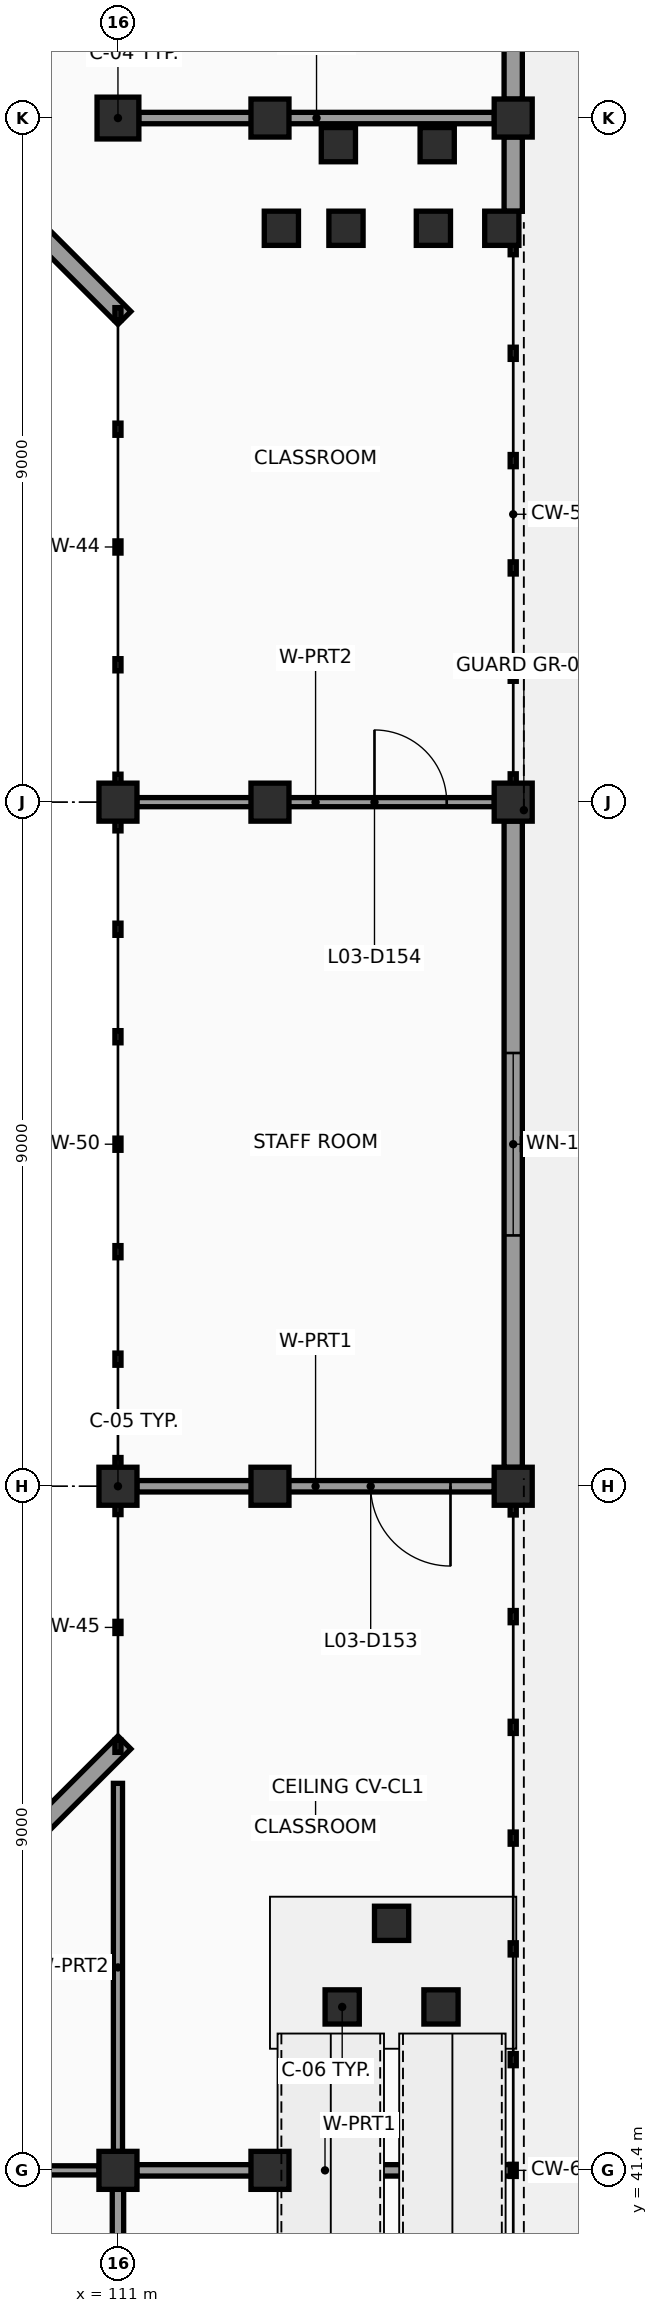
"""IFC4 building model, lengths in metres.
Left out: names, types, materials, properties, quantities, classifications, styles, units other than length and angle.
Written with IfcOpenShell. Run it as: python <this file> out.ifc"""

import sys

from ifc_helpers import new_model, si_unit, direction, frame, frame_2d, origin, origin_2d, place, context, subcontext, project, spatial, rectangle, extrude, element, fill, save


model = new_model("IFC4")
c1 = context("Model", 3, precision=1e-05, world=origin(), true_north=direction((0.0, 1.0)))
c2 = subcontext(c1, "Body", "Model", "MODEL_VIEW")
j1 = project(units=[si_unit("LENGTHUNIT", "METRE"), si_unit("PLANEANGLEUNIT", "RADIAN")], contexts=[c1])
p1 = place(None, origin())
s1 = spatial("IfcSite", under=j1, at=p1, CompositionType="ELEMENT")
p2 = place(p1, origin())
s2 = spatial("IfcBuilding", under=s1, at=p2, CompositionType="ELEMENT")
p3 = place(p2, frame((0.0, 0.0, 11.4)))
s3 = spatial("IfcBuildingStorey", under=s2, at=p3, CompositionType="ELEMENT", Elevation=11.4)
for number, where, z_axis, x_axis in (
    (1, (111.0, 41.4, 0.0), (0.0, 0.0, 1.0), (1.0, 0.0, 0.0)),
    (2, (111.0, 50.4, 0.0), (0.0, 0.0, 1.0), (1.0, 0.0, 0.0)),
    (3, (111.0, 59.4, 0.0), (0.0, 0.0, 1.0), (1.0, 0.0, 0.0)),
):
    element("IfcColumn", number, at=place(p3, frame(where, z_axis=z_axis, x_axis=x_axis)), inside=s3, PredefinedType="COLUMN", context=c2, shape_type="SweptSolid", body=[
        extrude(rectangle(XDim=0.5, YDim=0.5, at=origin_2d()), origin(), (0.0, 0.0, 1.0), 3.34),
    ])
p4 = place(p3, frame((111.0, 68.4, 0.0), z_axis=(0.0, 0.0, 1.0), x_axis=(1.0, 0.0, 0.0)))
e4 = element("IfcColumn", 4, at=p4, inside=s3, PredefinedType="COLUMN", context=c2, shape_type="SweptSolid", body=[
    extrude(rectangle(XDim=0.55, YDim=0.55, at=origin_2d()), origin(), (0.0, 0.0, 1.0), 3.6),
])
for number, where, z_axis, x_axis in (
    (5, (116.2, 50.4, 0.0), (0.0, 0.0, 1.0), (1.0, 0.0, 0.0)),
    (6, (116.2, 59.4, 0.0), (0.0, 0.0, 1.0), (1.0, 0.0, 0.0)),
):
    element("IfcColumn", number, at=place(p3, frame(where, z_axis=z_axis, x_axis=x_axis)), inside=s3, PredefinedType="COLUMN", context=c2, shape_type="SweptSolid", body=[
        extrude(rectangle(XDim=0.5, YDim=0.5, at=origin_2d()), origin(), (0.0, 0.0, 1.0), 3.28),
    ])
p5 = place(p3, frame((116.2, 68.4, 0.0), z_axis=(0.0, 0.0, 1.0), x_axis=(1.0, 0.0, 0.0)))
e7 = element("IfcColumn", 7, at=p5, inside=s3, PredefinedType="COLUMN", context=c2, shape_type="SweptSolid", body=[
    extrude(rectangle(XDim=0.5, YDim=0.5, at=origin_2d()), origin(), (0.0, 0.0, 1.0), 3.6),
])
for number, where, z_axis, x_axis in (
    (8, (113.0, 41.4, 0.0), (0.0, 0.0, 1.0), (1.0, 0.0, 0.0)),
    (9, (113.0, 50.4, 0.0), (0.0, 0.0, 1.0), (1.0, 0.0, 0.0)),
    (10, (113.0, 59.4, 0.0), (0.0, 0.0, 1.0), (1.0, 0.0, 0.0)),
):
    element("IfcColumn", number, at=place(p3, frame(where, z_axis=z_axis, x_axis=x_axis)), inside=s3, PredefinedType="COLUMN", context=c2, shape_type="SweptSolid", body=[
        extrude(rectangle(XDim=0.5, YDim=0.5, at=origin_2d()), origin(), (0.0, 0.0, 1.0), 3.28),
    ])
p6 = place(p3, frame((113.0, 68.4, 0.0), z_axis=(0.0, 0.0, 1.0), x_axis=(1.0, 0.0, 0.0)))
e11 = element("IfcColumn", 11, at=p6, inside=s3, PredefinedType="COLUMN", context=c2, shape_type="SweptSolid", body=[
    extrude(rectangle(XDim=0.5, YDim=0.5, at=origin_2d()), origin(), (0.0, 0.0, 1.0), 3.6),
])
for number, where, z_axis, x_axis in (
    (12, (113.95, 43.55, 0.0), (0.0, 0.0, 1.0), (1.0, 0.0, 0.0)),
    (13, (115.25, 43.55, 0.0), (0.0, 0.0, 1.0), (1.0, 0.0, 0.0)),
    (14, (114.6, 44.65, 0.0), (0.0, 0.0, 1.0), (1.0, 0.0, 0.0)),
):
    element("IfcColumn", number, at=place(p3, frame(where, z_axis=z_axis, x_axis=x_axis)), inside=s3, PredefinedType="COLUMN", context=c2, shape_type="SweptSolid", body=[
        extrude(rectangle(XDim=0.45, YDim=0.45, at=origin_2d()), origin(), (0.0, 0.0, 1.0), 1.58),
    ])
for number, where, z_axis, x_axis in (
    (15, (115.15, 66.95, 0.0), (0.0, 0.0, 1.0), (1.0, 0.0, 0.0)),
    (16, (116.05, 66.95, 0.0), (0.0, 0.0, 1.0), (1.0, 0.0, 0.0)),
    (17, (115.2, 68.05, 0.0), (0.0, 0.0, 1.0), (1.0, 0.0, 0.0)),
):
    element("IfcColumn", number, at=place(p3, frame(where, z_axis=z_axis, x_axis=x_axis)), inside=s3, PredefinedType="COLUMN", context=c2, shape_type="SweptSolid", body=[
        extrude(rectangle(XDim=0.45, YDim=0.45, at=origin_2d()), origin(), (0.0, 0.0, 1.0), 3.6),
    ])
for number, where, z_axis, x_axis in (
    (18, (113.15, 66.95, 0.0), (0.0, 0.0, 1.0), (1.0, 0.0, 0.0)),
    (19, (114.0, 66.95, 0.0), (0.0, 0.0, 1.0), (1.0, 0.0, 0.0)),
    (20, (113.9, 68.05, 0.0), (0.0, 0.0, 1.0), (1.0, 0.0, 0.0)),
):
    element("IfcColumn", number, at=place(p3, frame(where, z_axis=z_axis, x_axis=x_axis)), inside=s3, PredefinedType="COLUMN", context=c2, shape_type="SweptSolid", body=[
        extrude(rectangle(XDim=0.45, YDim=0.45, at=origin_2d()), origin(), (0.0, 0.0, 1.0), 3.38),
    ])
p7 = place(p3, frame((116.2, 71.152, 0.0), z_axis=(0.0, 0.0, 1.0), x_axis=(0.0, -1.0, 0.0)))
e21 = element("IfcWall", 21, at=p7, inside=s3, PredefinedType="SOLIDWALL", context=c2, shape_type="SweptSolid", body=[
    extrude(rectangle(XDim=2.504, YDim=0.24, at=frame_2d((1.252, 0.0))), origin(), (0.0, 0.0, 1.0), 3.34),
])
p8 = place(p3, frame((116.2, 68.152, 0.0), z_axis=(0.0, 0.0, 1.0), x_axis=(0.0, -1.0, 0.0)))
e22 = element("IfcWall", 22, at=p8, inside=s3, PredefinedType="SOLIDWALL", context=c2, shape_type="SweptSolid", body=[
    extrude(rectangle(XDim=0.979, YDim=0.24, at=frame_2d((0.49, 0.0))), origin(), (0.0, 0.0, 1.0), 3.34),
])
p9 = place(p3, frame((116.2, 59.152, 0.0), z_axis=(0.0, 0.0, 1.0), x_axis=(0.0, -1.0, 0.0)))
e23 = element("IfcWall", 23, at=p9, inside=s3, PredefinedType="SOLIDWALL", context=c2, shape_type="SweptSolid", body=[
    extrude(rectangle(XDim=8.504, YDim=0.24, at=frame_2d((4.252, 0.0))), origin(), (0.0, 0.0, 1.0), 3.34),
])
p10 = place(p9, frame((3.052, 0.0, 0.95)))
e24 = element("IfcOpeningElement", 24, at=p10, cuts=e23, PredefinedType="OPENING", context=c2, shape_type="SweptSolid", body=[
    extrude(rectangle(XDim=2.4, YDim=1.5, at=frame_2d((1.2, 0.75))), frame((0.0, 0.13, 0.0), z_axis=(0.0, -1.0, 0.0), x_axis=(1.0, 0.0, 0.0)), (0.0, 0.0, 1.0), 0.26),
])
p11 = place(p3, frame((105.371, 41.315, 0.0), z_axis=(0.0, 0.0, 1.0), x_axis=(0.707121887885, 0.707091674165, 0.0)))
e25 = element("IfcWall", 25, at=p11, inside=s3, PredefinedType="SOLIDWALL", context=c2, shape_type="SweptSolid", body=[
    extrude(rectangle(XDim=8.081, YDim=0.24, at=frame_2d((4.04, 0.0))), origin(), (0.0, 0.0, 1.0), 2.53),
])
p12 = place(p3, frame((111.085, 65.771, 0.0), z_axis=(0.0, 0.0, 1.0), x_axis=(-0.707106781187, 0.707106781187, 0.0)))
e26 = element("IfcWall", 26, at=p12, inside=s3, PredefinedType="SOLIDWALL", context=c2, shape_type="SweptSolid", body=[
    extrude(rectangle(XDim=8.081, YDim=0.24, at=frame_2d((4.04, 0.0))), origin(), (0.0, 0.0, 1.0), 2.58),
])
p13 = place(p3, frame((105.908, 41.4, 0.0), z_axis=(0.0, 0.0, 1.0), x_axis=(1.0, 0.0, 0.0)))
e27 = element("IfcWall", 27, at=p13, inside=s3, PredefinedType="PARTITIONING", context=c2, shape_type="SweptSolid", body=[
    extrude(rectangle(XDim=4.844, YDim=0.12, at=frame_2d((2.422, 0.0))), origin(), (0.0, 0.0, 1.0), 2.53),
])
p14 = place(p13, frame((1.922, 0.0, 0.0)))
e28 = element("IfcOpeningElement", 28, at=p14, cuts=e27, PredefinedType="OPENING", context=c2, shape_type="SweptSolid", body=[
    extrude(rectangle(XDim=1.0, YDim=2.1, at=frame_2d((0.5, 1.05))), frame((0.0, 0.07, 0.0), z_axis=(0.0, -1.0, 0.0), x_axis=(1.0, 0.0, 0.0)), (0.0, 0.0, 1.0), 0.14),
])
p15 = place(p3, frame((111.0, 41.152, 0.0), z_axis=(0.0, 0.0, 1.0), x_axis=(0.0, -1.0, 0.0)))
e29 = element("IfcWall", 29, at=p15, inside=s3, PredefinedType="PARTITIONING", context=c2, shape_type="SweptSolid", body=[
    extrude(rectangle(XDim=8.429, YDim=0.15, at=frame_2d((4.215, 0.0))), origin(), (0.0, 0.0, 1.0), 2.92),
])
p16 = place(p3, frame((111.248, 41.4, 0.0), z_axis=(0.0, 0.0, 1.0), x_axis=(1.0, 0.0, 0.0)))
e30 = element("IfcWall", 30, at=p16, inside=s3, PredefinedType="PARTITIONING", context=c2, shape_type="SweptSolid", body=[
    extrude(rectangle(XDim=4.952, YDim=0.15, at=frame_2d((2.476, 0.0))), origin(), (0.0, 0.0, 1.0), 3.34),
])
p17 = place(p3, frame((111.0, 41.648, 0.0), z_axis=(0.0, 0.0, 1.0), x_axis=(0.0, 1.0, 0.0)))
e31 = element("IfcWall", 31, at=p17, inside=s3, PredefinedType="PARTITIONING", context=c2, shape_type="SweptSolid", body=[
    extrude(rectangle(XDim=4.844, YDim=0.12, at=frame_2d((2.422, 0.0))), origin(), (0.0, 0.0, 1.0), 2.92),
])
p18 = place(p3, frame((111.248, 50.4, 0.0), z_axis=(0.0, 0.0, 1.0), x_axis=(1.0, 0.0, 0.0)))
e32 = element("IfcWall", 32, at=p18, inside=s3, PredefinedType="PARTITIONING", context=c2, shape_type="SweptSolid", body=[
    extrude(rectangle(XDim=4.704, YDim=0.15, at=frame_2d((2.352, 0.0))), origin(), (0.0, 0.0, 1.0), 3.34),
])
p19 = place(p18, frame((3.077, 0.0, 0.0)))
e33 = element("IfcOpeningElement", 33, at=p19, cuts=e32, PredefinedType="OPENING", context=c2, shape_type="SweptSolid", body=[
    extrude(rectangle(XDim=1.05, YDim=2.15, at=frame_2d((0.525, 1.075))), frame((0.0, 0.085, 0.0), z_axis=(0.0, -1.0, 0.0), x_axis=(1.0, 0.0, 0.0)), (0.0, 0.0, 1.0), 0.17),
])
p20 = place(p3, frame((111.248, 59.4, 0.0), z_axis=(0.0, 0.0, 1.0), x_axis=(1.0, 0.0, 0.0)))
e34 = element("IfcWall", 34, at=p20, inside=s3, PredefinedType="PARTITIONING", context=c2, shape_type="SweptSolid", body=[
    extrude(rectangle(XDim=4.704, YDim=0.12, at=frame_2d((2.352, 0.0))), origin(), (0.0, 0.0, 1.0), 3.34),
])
p21 = place(p20, frame((3.127, 0.0, 0.0)))
e35 = element("IfcOpeningElement", 35, at=p21, cuts=e34, PredefinedType="OPENING", context=c2, shape_type="SweptSolid", body=[
    extrude(rectangle(XDim=0.95, YDim=2.1, at=frame_2d((0.475, 1.05))), frame((0.0, 0.07, 0.0), z_axis=(0.0, -1.0, 0.0), x_axis=(1.0, 0.0, 0.0)), (0.0, 0.0, 1.0), 0.14),
])
p22 = place(p3, frame((111.273, 68.4, 0.0), z_axis=(0.0, 0.0, 1.0), x_axis=(1.0, 0.0, 0.0)))
e36 = element("IfcWall", 36, at=p22, inside=s3, PredefinedType="PARTITIONING", context=c2, shape_type="SweptSolid", body=[
    extrude(rectangle(XDim=4.679, YDim=0.15, at=frame_2d((2.339, 0.0))), origin(), (0.0, 0.0, 1.0), 3.34),
])
p23 = place(p10, origin())
e37 = element("IfcWindow", 37, at=p23, inside=s3, PartitioningType="SINGLE_PANEL", PredefinedType="WINDOW", context=c2, shape_type="SweptSolid", body=[
    extrude(rectangle(XDim=2.4, YDim=1.5, at=frame_2d((1.2, 0.75))), frame((0.0, 0.03, 0.0), z_axis=(0.0, -1.0, 0.0), x_axis=(1.0, 0.0, 0.0)), (0.0, 0.0, 1.0), 0.06),
])
fill(e24, e37)
p24 = place(p19, origin())
e38 = element("IfcDoor", 38, at=p24, inside=s3, OperationType="SINGLE_SWING_RIGHT", PredefinedType="DOOR", context=c2, shape_type="SweptSolid", body=[
    extrude(rectangle(XDim=1.05, YDim=2.15, at=frame_2d((0.525, 1.075))), frame((0.0, 0.025, 0.0), z_axis=(0.0, -1.0, 0.0), x_axis=(1.0, 0.0, 0.0)), (0.0, 0.0, 1.0), 0.05),
])
fill(e33, e38)
p25 = place(p21, origin())
e39 = element("IfcDoor", 39, at=p25, inside=s3, OperationType="SINGLE_SWING_LEFT", PredefinedType="DOOR", context=c2, shape_type="SweptSolid", body=[
    extrude(rectangle(XDim=0.95, YDim=2.1, at=frame_2d((0.475, 1.05))), frame((0.0, 0.025, 0.0), z_axis=(0.0, -1.0, 0.0), x_axis=(1.0, 0.0, 0.0)), (0.0, 0.0, 1.0), 0.05),
])
fill(e35, e39)
save(model, sys.argv[1])
